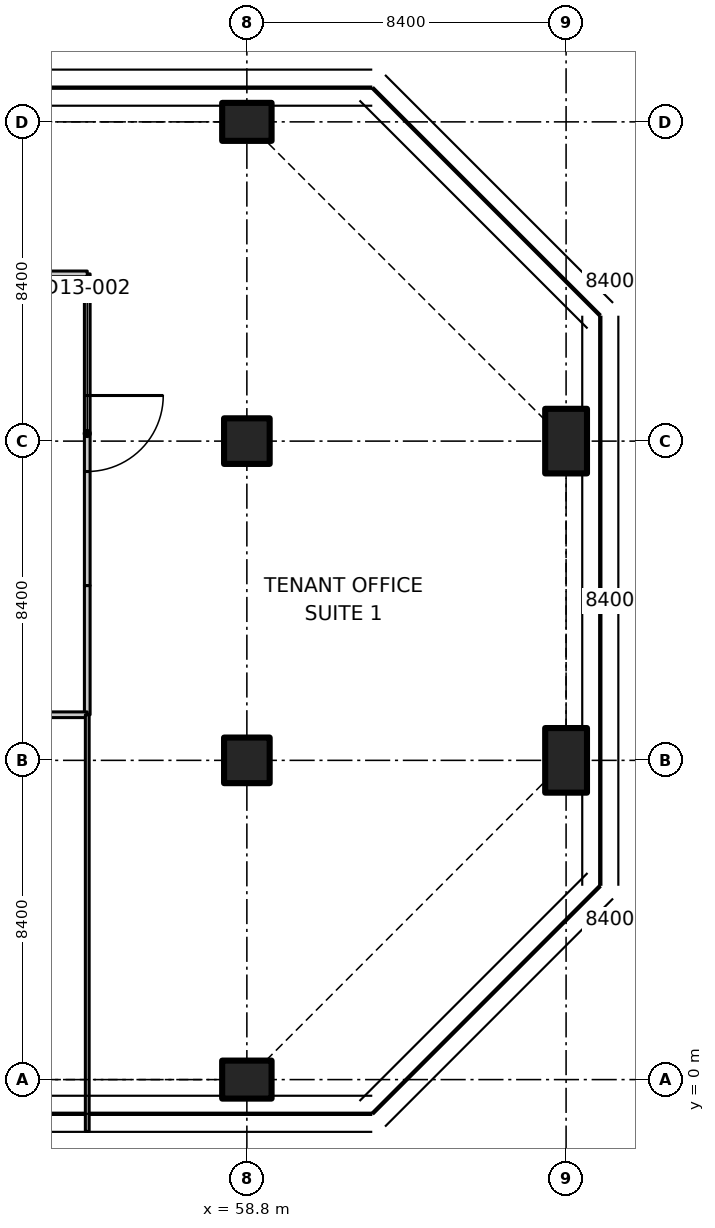
"""IFC4 building model, lengths in metres.
Left out: names, types, materials, properties, quantities, classifications, styles, units other than length and angle.
Written with IfcOpenShell. Run it as: python <this file> out.ifc"""

import sys

from ifc_helpers import new_model, si_unit, direction, frame, frame_2d, origin, origin_2d, place, context, subcontext, project, spatial, polyline, rectangle, outline, extrude, element, fill, save


model = new_model("IFC4")
c1 = context("Model", 3, precision=1e-05, world=origin(), true_north=direction((0.0, 1.0)))
c2 = subcontext(c1, "Body", "Model", "MODEL_VIEW")
j1 = project(units=[si_unit("LENGTHUNIT", "METRE"), si_unit("PLANEANGLEUNIT", "RADIAN")], contexts=[c1])
p1 = place(None, origin())
s1 = spatial("IfcSite", under=j1, at=p1, CompositionType="ELEMENT")
p2 = place(p1, origin())
s2 = spatial("IfcBuilding", under=s1, at=p2, CompositionType="ELEMENT")
p3 = place(p2, frame((0.0, 0.0, 95.3)))
s3 = spatial("IfcBuildingStorey", under=s2, at=p3, CompositionType="ELEMENT", Elevation=95.3)
p4 = place(p3, frame((58.8, 0.0, 0.0), z_axis=(0.0, 0.0, 1.0), x_axis=(0.0, 1.0, 0.0)))
e1 = element("IfcColumn", 1, at=p4, inside=s3, PredefinedType="COLUMN", context=c2, shape_type="SweptSolid", body=[
    extrude(rectangle(XDim=1.0, YDim=1.3, at=origin_2d()), origin(), (0.0, 0.0, 1.0), 3.35),
])
for number, where, z_axis, x_axis in (
    (2, (58.8, 8.4, 0.0), (0.0, 0.0, 1.0), (1.0, 0.0, 0.0)),
    (3, (58.8, 16.8, 0.0), (0.0, 0.0, 1.0), (1.0, 0.0, 0.0)),
):
    element("IfcColumn", number, at=place(p3, frame(where, z_axis=z_axis, x_axis=x_axis)), inside=s3, PredefinedType="COLUMN", context=c2, shape_type="SweptSolid", body=[
        extrude(rectangle(XDim=1.2, YDim=1.2, at=origin_2d()), origin(), (0.0, 0.0, 1.0), 3.35),
    ])
p5 = place(p3, frame((58.8, 25.2, 0.0), z_axis=(0.0, 0.0, 1.0), x_axis=(0.0, 1.0, 0.0)))
e4 = element("IfcColumn", 4, at=p5, inside=s3, PredefinedType="COLUMN", context=c2, shape_type="SweptSolid", body=[
    extrude(rectangle(XDim=1.0, YDim=1.3, at=origin_2d()), origin(), (0.0, 0.0, 1.0), 3.35),
])
for number, where, z_axis, x_axis in (
    (5, (67.2, 8.4, 0.0), (0.0, 0.0, 1.0), (1.0, 0.0, 0.0)),
    (6, (67.2, 16.8, 0.0), (0.0, 0.0, 1.0), (1.0, 0.0, 0.0)),
):
    element("IfcColumn", number, at=place(p3, frame(where, z_axis=z_axis, x_axis=x_axis)), inside=s3, PredefinedType="COLUMN", context=c2, shape_type="SweptSolid", body=[
        extrude(rectangle(XDim=1.1, YDim=1.7, at=origin_2d()), origin(), (0.0, 0.0, 1.0), 3.35),
    ])
p6 = place(p3, frame((54.6, 13.0, 0.0), z_axis=(0.0, 0.0, 1.0), x_axis=(0.0, -1.0, 0.0)))
e7 = element("IfcWall", 7, at=p6, inside=s3, PredefinedType="PARTITIONING", context=c2, shape_type="SweptSolid", body=[
    extrude(rectangle(XDim=3.4, YDim=0.15, at=frame_2d((1.7, 0.0))), origin(), (0.0, 0.0, 1.0), 3.33),
])
p7 = place(p3, frame((54.6, 9.6, 0.0), z_axis=(0.0, 0.0, 1.0), x_axis=(-1.0, 0.0, 0.0)))
e8 = element("IfcWall", 8, at=p7, inside=s3, PredefinedType="PARTITIONING", context=c2, shape_type="SweptSolid", body=[
    extrude(rectangle(XDim=16.8, YDim=0.15, at=frame_2d((8.4, 0.0))), origin(), (0.0, 0.0, 1.0), 3.33),
])
p8 = place(p7, frame((7.5, 0.0, 0.0)))
e9 = element("IfcOpeningElement", 9, at=p8, cuts=e8, PredefinedType="OPENING", context=c2, shape_type="SweptSolid", body=[
    extrude(rectangle(XDim=2.0, YDim=2.4, at=frame_2d((1.0, 1.2))), frame((0.0, 0.085, 0.0), z_axis=(0.0, -1.0, 0.0), x_axis=(1.0, 0.0, 0.0)), (0.0, 0.0, 1.0), 0.17),
])
p9 = place(p3, frame((54.6, 21.2, 0.0), z_axis=(0.0, 0.0, 1.0), x_axis=(0.0, -1.0, 0.0)))
e10 = element("IfcWall", 10, at=p9, inside=s3, PredefinedType="PARTITIONING", context=c2, shape_type="SweptSolid", body=[
    extrude(rectangle(XDim=8.2, YDim=0.15, at=frame_2d((4.1, 0.0))), origin(), (0.0, 0.0, 1.0), 3.33),
])
p10 = place(p9, frame((3.2, 0.0, 0.0)))
e11 = element("IfcOpeningElement", 11, at=p10, cuts=e10, PredefinedType="OPENING", context=c2, shape_type="SweptSolid", body=[
    extrude(rectangle(XDim=2.0, YDim=2.4, at=frame_2d((1.0, 1.2))), frame((0.0, 0.085, 0.0), z_axis=(0.0, -1.0, 0.0), x_axis=(1.0, 0.0, 0.0)), (0.0, 0.0, 1.0), 0.17),
])
p11 = place(p3, frame((54.6, -1.365, 0.0), z_axis=(0.0, 0.0, 1.0), x_axis=(0.0, 1.0, 0.0)))
e12 = element("IfcWall", 12, at=p11, inside=s3, PredefinedType="PARTITIONING", context=c2, shape_type="SweptSolid", body=[
    extrude(outline(polyline([(0.0, 0.0), (10.965, 0.0), (10.965, 3.33), (1.815, 3.33), (1.813, 2.98), (0.917, 2.98), (0.915, 3.33), (0.265, 3.33), (0.0, 3.33), (0.0, 0.0)])), frame((0.0, 0.05, 0.0), z_axis=(0.0, -1.0, 0.0), x_axis=(1.0, 0.0, 0.0)), (0.0, 0.0, 1.0), 0.1),
])
p12 = place(p3, frame((51.0, 21.2, 0.0), z_axis=(0.0, 0.0, 1.0), x_axis=(1.0, 0.0, 0.0)))
e13 = element("IfcWall", 13, at=p12, inside=s3, PredefinedType="PARTITIONING", context=c2, shape_type="SweptSolid", body=[
    extrude(rectangle(XDim=3.6, YDim=0.15, at=frame_2d((1.8, 0.0))), origin(), (0.0, 0.0, 1.0), 3.33),
])
p13 = place(p10, origin())
e14 = element("IfcDoor", 14, at=p13, inside=s3, OperationType="DOUBLE_DOOR_SINGLE_SWING", PredefinedType="DOOR", context=c2, shape_type="SweptSolid", body=[
    extrude(rectangle(XDim=2.0, YDim=2.4, at=frame_2d((1.0, 1.2))), frame((0.0, 0.025, 0.0), z_axis=(0.0, -1.0, 0.0), x_axis=(1.0, 0.0, 0.0)), (0.0, 0.0, 1.0), 0.05),
])
fill(e11, e14)
save(model, sys.argv[1])
